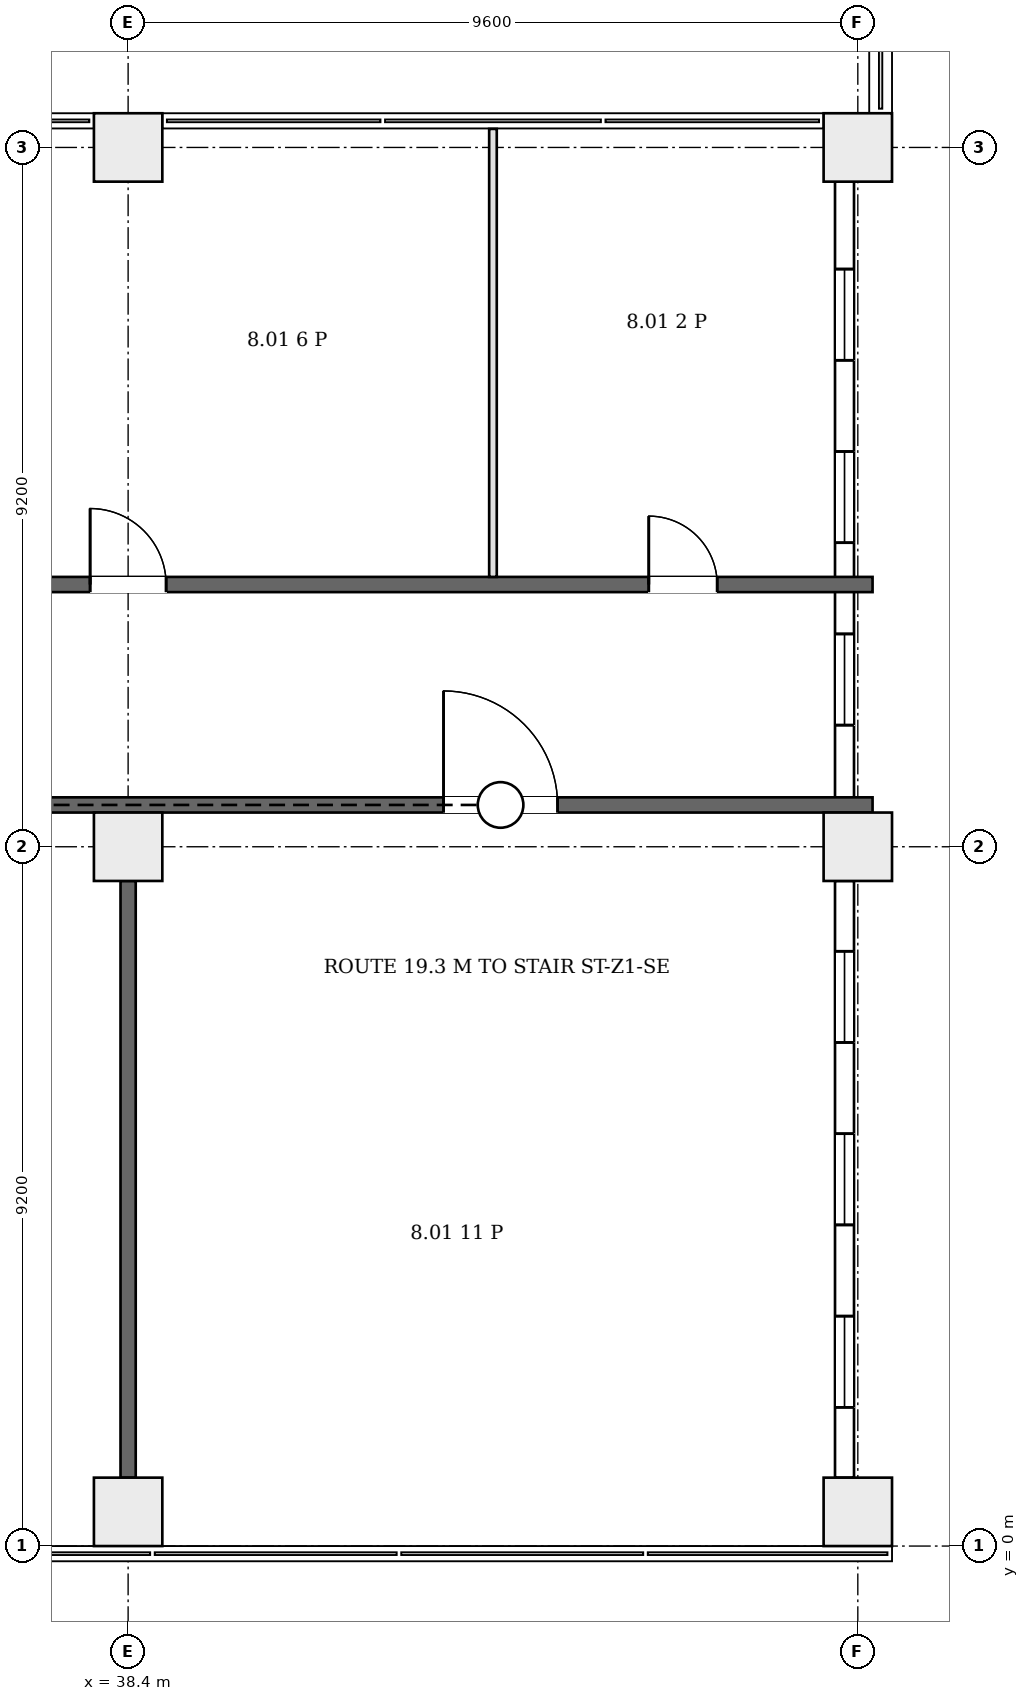
"""IFC4 building model, lengths in metres.
Left out: names, types, materials, properties, quantities, classifications, styles, units other than length and angle.
Written with IfcOpenShell. Run it as: python <this file> out.ifc"""

import sys

from ifc_helpers import new_model, si_unit, direction, frame, frame_2d, origin, origin_2d, place, context, subcontext, project, spatial, rectangle, extrude, element, fill, save


model = new_model("IFC4")
c1 = context("Model", 3, precision=1e-05, world=origin(), true_north=direction((0.0, 1.0)))
c2 = subcontext(c1, "Body", "Model", "MODEL_VIEW")
j1 = project(units=[si_unit("LENGTHUNIT", "METRE"), si_unit("PLANEANGLEUNIT", "RADIAN")], contexts=[c1])
p1 = place(None, origin())
s1 = spatial("IfcSite", under=j1, at=p1, CompositionType="ELEMENT")
p2 = place(p1, origin())
s2 = spatial("IfcBuilding", under=s1, at=p2, CompositionType="ELEMENT")
p3 = place(p2, frame((0.0, 0.0, 44.5)))
s3 = spatial("IfcBuildingStorey", under=s2, at=p3, CompositionType="ELEMENT", Elevation=44.5)
for number, where, z_axis, x_axis in (
    (1, (38.4, 0.45, 0.0), (0.0, 0.0, 1.0), (1.0, 0.0, 0.0)),
    (2, (48.0, 0.45, 0.0), (0.0, 0.0, 1.0), (1.0, 0.0, 0.0)),
    (3, (38.4, 9.2, 0.0), (0.0, 0.0, 1.0), (1.0, 0.0, 0.0)),
    (4, (48.0, 9.2, 0.0), (0.0, 0.0, 1.0), (1.0, 0.0, 0.0)),
    (5, (38.4, 18.4, 0.0), (0.0, 0.0, 1.0), (1.0, 0.0, 0.0)),
    (6, (48.0, 18.4, 0.0), (0.0, 0.0, 1.0), (1.0, 0.0, 0.0)),
):
    element("IfcColumn", number, at=place(p3, frame(where, z_axis=z_axis, x_axis=x_axis)), inside=s3, PredefinedType="COLUMN", context=c2, shape_type="SweptSolid", body=[
        extrude(rectangle(XDim=0.9, YDim=0.9, at=origin_2d()), origin(), (0.0, 0.0, 1.0), 4.2),
    ])
p4 = place(p3, frame((47.825, 0.9, 0.0), z_axis=(0.0, 0.0, 1.0), x_axis=(0.0, 1.0, 0.0)))
e7 = element("IfcWall", 7, at=p4, inside=s3, PredefinedType="ELEMENTEDWALL", context=c2, shape_type="SweptSolid", body=[
    extrude(rectangle(XDim=7.85, YDim=0.25, at=frame_2d((3.925, 0.0))), origin(), (0.0, 0.0, 1.0), 3.3),
])
p5 = place(p4, frame((0.925, 0.0, 0.6)))
e8 = element("IfcOpeningElement", 8, at=p5, cuts=e7, PredefinedType="OPENING", context=c2, shape_type="SweptSolid", body=[
    extrude(rectangle(XDim=1.2, YDim=2.6, at=frame_2d((0.6, 1.3))), frame((0.0, 0.135, 0.0), z_axis=(0.0, -1.0, 0.0), x_axis=(1.0, 0.0, 0.0)), (0.0, 0.0, 1.0), 0.27),
])
p6 = place(p4, frame((3.325, 0.0, 0.6)))
e9 = element("IfcOpeningElement", 9, at=p6, cuts=e7, PredefinedType="OPENING", context=c2, shape_type="SweptSolid", body=[
    extrude(rectangle(XDim=1.2, YDim=2.6, at=frame_2d((0.6, 1.3))), frame((0.0, 0.135, 0.0), z_axis=(0.0, -1.0, 0.0), x_axis=(1.0, 0.0, 0.0)), (0.0, 0.0, 1.0), 0.27),
])
p7 = place(p4, frame((5.725, 0.0, 0.6)))
e10 = element("IfcOpeningElement", 10, at=p7, cuts=e7, PredefinedType="OPENING", context=c2, shape_type="SweptSolid", body=[
    extrude(rectangle(XDim=1.2, YDim=2.6, at=frame_2d((0.6, 1.3))), frame((0.0, 0.135, 0.0), z_axis=(0.0, -1.0, 0.0), x_axis=(1.0, 0.0, 0.0)), (0.0, 0.0, 1.0), 0.27),
])
p8 = place(p3, frame((47.825, 9.65, 0.0), z_axis=(0.0, 0.0, 1.0), x_axis=(0.0, 1.0, 0.0)))
e11 = element("IfcWall", 11, at=p8, inside=s3, PredefinedType="ELEMENTEDWALL", context=c2, shape_type="SweptSolid", body=[
    extrude(rectangle(XDim=8.3, YDim=0.25, at=frame_2d((4.15, 0.0))), origin(), (0.0, 0.0, 1.0), 3.3),
])
p9 = place(p8, frame((1.15, 0.0, 0.6)))
e12 = element("IfcOpeningElement", 12, at=p9, cuts=e11, PredefinedType="OPENING", context=c2, shape_type="SweptSolid", body=[
    extrude(rectangle(XDim=1.2, YDim=2.6, at=frame_2d((0.6, 1.3))), frame((0.0, 0.135, 0.0), z_axis=(0.0, -1.0, 0.0), x_axis=(1.0, 0.0, 0.0)), (0.0, 0.0, 1.0), 0.27),
])
p10 = place(p8, frame((3.55, 0.0, 0.6)))
e13 = element("IfcOpeningElement", 13, at=p10, cuts=e11, PredefinedType="OPENING", context=c2, shape_type="SweptSolid", body=[
    extrude(rectangle(XDim=1.2, YDim=2.6, at=frame_2d((0.6, 1.3))), frame((0.0, 0.135, 0.0), z_axis=(0.0, -1.0, 0.0), x_axis=(1.0, 0.0, 0.0)), (0.0, 0.0, 1.0), 0.27),
])
p11 = place(p8, frame((5.95, 0.0, 0.6)))
e14 = element("IfcOpeningElement", 14, at=p11, cuts=e11, PredefinedType="OPENING", context=c2, shape_type="SweptSolid", body=[
    extrude(rectangle(XDim=1.2, YDim=2.6, at=frame_2d((0.6, 1.3))), frame((0.0, 0.135, 0.0), z_axis=(0.0, -1.0, 0.0), x_axis=(1.0, 0.0, 0.0)), (0.0, 0.0, 1.0), 0.27),
])
p12 = place(p3, frame((4.3, 9.75, 0.0), z_axis=(0.0, 0.0, 1.0), x_axis=(1.0, 0.0, 0.0)))
e15 = element("IfcWall", 15, at=p12, inside=s3, PredefinedType="PARTITIONING", context=c2, shape_type="SweptSolid", body=[
    extrude(rectangle(XDim=43.894, YDim=0.2, at=frame_2d((21.947, 0.0))), origin(), (0.0, 0.0, 1.0), 3.9),
])
p13 = place(p12, frame((2.2, 0.0, 0.0)))
e16 = element("IfcOpeningElement", 16, at=p13, cuts=e15, PredefinedType="OPENING", context=c2, shape_type="SweptSolid", body=[
    extrude(rectangle(XDim=1.0, YDim=2.1, at=frame_2d((0.5, 1.05))), frame((0.0, 0.11, 0.0), z_axis=(0.0, -1.0, 0.0), x_axis=(1.0, 0.0, 0.0)), (0.0, 0.0, 1.0), 0.22),
])
p14 = place(p12, frame((12.0, 0.0, 0.0)))
e17 = element("IfcOpeningElement", 17, at=p14, cuts=e15, PredefinedType="OPENING", context=c2, shape_type="SweptSolid", body=[
    extrude(rectangle(XDim=1.0, YDim=2.1, at=frame_2d((0.5, 1.05))), frame((0.0, 0.11, 0.0), z_axis=(0.0, -1.0, 0.0), x_axis=(1.0, 0.0, 0.0)), (0.0, 0.0, 1.0), 0.22),
])
p15 = place(p12, frame((21.6, 0.0, 0.0)))
e18 = element("IfcOpeningElement", 18, at=p15, cuts=e15, PredefinedType="OPENING", context=c2, shape_type="SweptSolid", body=[
    extrude(rectangle(XDim=1.0, YDim=2.1, at=frame_2d((0.5, 1.05))), frame((0.0, 0.11, 0.0), z_axis=(0.0, -1.0, 0.0), x_axis=(1.0, 0.0, 0.0)), (0.0, 0.0, 1.0), 0.22),
])
p16 = place(p12, frame((28.8, 0.0, 0.0)))
e19 = element("IfcOpeningElement", 19, at=p16, cuts=e15, PredefinedType="OPENING", context=c2, shape_type="SweptSolid", body=[
    extrude(rectangle(XDim=1.0, YDim=2.1, at=frame_2d((0.5, 1.05))), frame((0.0, 0.11, 0.0), z_axis=(0.0, -1.0, 0.0), x_axis=(1.0, 0.0, 0.0)), (0.0, 0.0, 1.0), 0.22),
])
p17 = place(p12, frame((38.25, 0.0, 0.0)))
e20 = element("IfcOpeningElement", 20, at=p17, cuts=e15, PredefinedType="OPENING", context=c2, shape_type="SweptSolid", body=[
    extrude(rectangle(XDim=1.5, YDim=2.1, at=frame_2d((0.75, 1.05))), frame((0.0, 0.11, 0.0), z_axis=(0.0, -1.0, 0.0), x_axis=(1.0, 0.0, 0.0)), (0.0, 0.0, 1.0), 0.22),
])
p18 = place(p3, frame((27.206, 12.65, 0.0), z_axis=(0.0, 0.0, 1.0), x_axis=(1.0, 0.0, 0.0)))
e21 = element("IfcWall", 21, at=p18, inside=s3, PredefinedType="PARTITIONING", context=c2, shape_type="SweptSolid", body=[
    extrude(rectangle(XDim=20.988, YDim=0.2, at=frame_2d((10.494, 0.0))), origin(), (0.0, 0.0, 1.0), 3.9),
])
p19 = place(p18, frame((2.444, 0.0, 0.0)))
e22 = element("IfcOpeningElement", 22, at=p19, cuts=e21, PredefinedType="OPENING", context=c2, shape_type="SweptSolid", body=[
    extrude(rectangle(XDim=1.5, YDim=2.1, at=frame_2d((0.75, 1.05))), frame((0.0, 0.11, 0.0), z_axis=(0.0, -1.0, 0.0), x_axis=(1.0, 0.0, 0.0)), (0.0, 0.0, 1.0), 0.22),
])
p20 = place(p18, frame((10.694, 0.0, 0.0)))
e23 = element("IfcOpeningElement", 23, at=p20, cuts=e21, PredefinedType="OPENING", context=c2, shape_type="SweptSolid", body=[
    extrude(rectangle(XDim=1.0, YDim=2.1, at=frame_2d((0.5, 1.05))), frame((0.0, 0.11, 0.0), z_axis=(0.0, -1.0, 0.0), x_axis=(1.0, 0.0, 0.0)), (0.0, 0.0, 1.0), 0.22),
])
p21 = place(p18, frame((18.044, 0.0, 0.0)))
e24 = element("IfcOpeningElement", 24, at=p21, cuts=e21, PredefinedType="OPENING", context=c2, shape_type="SweptSolid", body=[
    extrude(rectangle(XDim=0.9, YDim=2.1, at=frame_2d((0.45, 1.05))), frame((0.0, 0.11, 0.0), z_axis=(0.0, -1.0, 0.0), x_axis=(1.0, 0.0, 0.0)), (0.0, 0.0, 1.0), 0.22),
])
p22 = place(p3, frame((38.4, 0.9, 0.0), z_axis=(0.0, 0.0, 1.0), x_axis=(0.0, 1.0, 0.0)))
e25 = element("IfcWall", 25, at=p22, inside=s3, PredefinedType="PARTITIONING", context=c2, shape_type="SweptSolid", body=[
    extrude(rectangle(XDim=7.85, YDim=0.2, at=frame_2d((3.925, 0.0))), origin(), (0.0, 0.0, 1.0), 3.9),
])
p23 = place(p3, frame((43.2, 12.75, 0.0), z_axis=(0.0, 0.0, 1.0), x_axis=(0.0, 1.0, 0.0)))
e26 = element("IfcWall", 26, at=p23, inside=s3, PredefinedType="PARTITIONING", context=c2, shape_type="SweptSolid", body=[
    extrude(rectangle(XDim=5.894, YDim=0.1, at=frame_2d((2.947, 0.0))), origin(), (0.0, 0.0, 1.0), 3.9),
])
p24 = place(p5, origin())
e27 = element("IfcWindow", 27, at=p24, inside=s3, PartitioningType="SINGLE_PANEL", PredefinedType="WINDOW", context=c2, shape_type="SweptSolid", body=[
    extrude(rectangle(XDim=1.2, YDim=2.6, at=frame_2d((0.6, 1.3))), frame((0.0, 0.03, 0.0), z_axis=(0.0, -1.0, 0.0), x_axis=(1.0, 0.0, 0.0)), (0.0, 0.0, 1.0), 0.06),
])
fill(e8, e27)
p25 = place(p6, origin())
e28 = element("IfcWindow", 28, at=p25, inside=s3, PartitioningType="SINGLE_PANEL", PredefinedType="WINDOW", context=c2, shape_type="SweptSolid", body=[
    extrude(rectangle(XDim=1.2, YDim=2.6, at=frame_2d((0.6, 1.3))), frame((0.0, 0.03, 0.0), z_axis=(0.0, -1.0, 0.0), x_axis=(1.0, 0.0, 0.0)), (0.0, 0.0, 1.0), 0.06),
])
fill(e9, e28)
p26 = place(p7, origin())
e29 = element("IfcWindow", 29, at=p26, inside=s3, PartitioningType="SINGLE_PANEL", PredefinedType="WINDOW", context=c2, shape_type="SweptSolid", body=[
    extrude(rectangle(XDim=1.2, YDim=2.6, at=frame_2d((0.6, 1.3))), frame((0.0, 0.03, 0.0), z_axis=(0.0, -1.0, 0.0), x_axis=(1.0, 0.0, 0.0)), (0.0, 0.0, 1.0), 0.06),
])
fill(e10, e29)
p27 = place(p9, origin())
e30 = element("IfcWindow", 30, at=p27, inside=s3, PartitioningType="SINGLE_PANEL", PredefinedType="WINDOW", context=c2, shape_type="SweptSolid", body=[
    extrude(rectangle(XDim=1.2, YDim=2.6, at=frame_2d((0.6, 1.3))), frame((0.0, 0.03, 0.0), z_axis=(0.0, -1.0, 0.0), x_axis=(1.0, 0.0, 0.0)), (0.0, 0.0, 1.0), 0.06),
])
fill(e12, e30)
p28 = place(p10, origin())
e31 = element("IfcWindow", 31, at=p28, inside=s3, PartitioningType="SINGLE_PANEL", PredefinedType="WINDOW", context=c2, shape_type="SweptSolid", body=[
    extrude(rectangle(XDim=1.2, YDim=2.6, at=frame_2d((0.6, 1.3))), frame((0.0, 0.03, 0.0), z_axis=(0.0, -1.0, 0.0), x_axis=(1.0, 0.0, 0.0)), (0.0, 0.0, 1.0), 0.06),
])
fill(e13, e31)
p29 = place(p11, origin())
e32 = element("IfcWindow", 32, at=p29, inside=s3, PartitioningType="SINGLE_PANEL", PredefinedType="WINDOW", context=c2, shape_type="SweptSolid", body=[
    extrude(rectangle(XDim=1.2, YDim=2.6, at=frame_2d((0.6, 1.3))), frame((0.0, 0.03, 0.0), z_axis=(0.0, -1.0, 0.0), x_axis=(1.0, 0.0, 0.0)), (0.0, 0.0, 1.0), 0.06),
])
fill(e14, e32)
p30 = place(p17, origin())
e33 = element("IfcDoor", 33, at=p30, inside=s3, OperationType="DOUBLE_DOOR_SINGLE_SWING", PredefinedType="DOOR", context=c2, shape_type="SweptSolid", body=[
    extrude(rectangle(XDim=1.5, YDim=2.1, at=frame_2d((0.75, 1.05))), frame((0.0, 0.025, 0.0), z_axis=(0.0, -1.0, 0.0), x_axis=(1.0, 0.0, 0.0)), (0.0, 0.0, 1.0), 0.05),
])
fill(e20, e33)
p31 = place(p20, origin())
e34 = element("IfcDoor", 34, at=p31, inside=s3, OperationType="SINGLE_SWING_RIGHT", PredefinedType="DOOR", context=c2, shape_type="SweptSolid", body=[
    extrude(rectangle(XDim=1.0, YDim=2.1, at=frame_2d((0.5, 1.05))), frame((0.0, 0.025, 0.0), z_axis=(0.0, -1.0, 0.0), x_axis=(1.0, 0.0, 0.0)), (0.0, 0.0, 1.0), 0.05),
])
fill(e23, e34)
p32 = place(p21, origin())
e35 = element("IfcDoor", 35, at=p32, inside=s3, OperationType="SINGLE_SWING_RIGHT", PredefinedType="DOOR", context=c2, shape_type="SweptSolid", body=[
    extrude(rectangle(XDim=0.9, YDim=2.1, at=frame_2d((0.45, 1.05))), frame((0.0, 0.025, 0.0), z_axis=(0.0, -1.0, 0.0), x_axis=(1.0, 0.0, 0.0)), (0.0, 0.0, 1.0), 0.05),
])
fill(e24, e35)
save(model, sys.argv[1])
